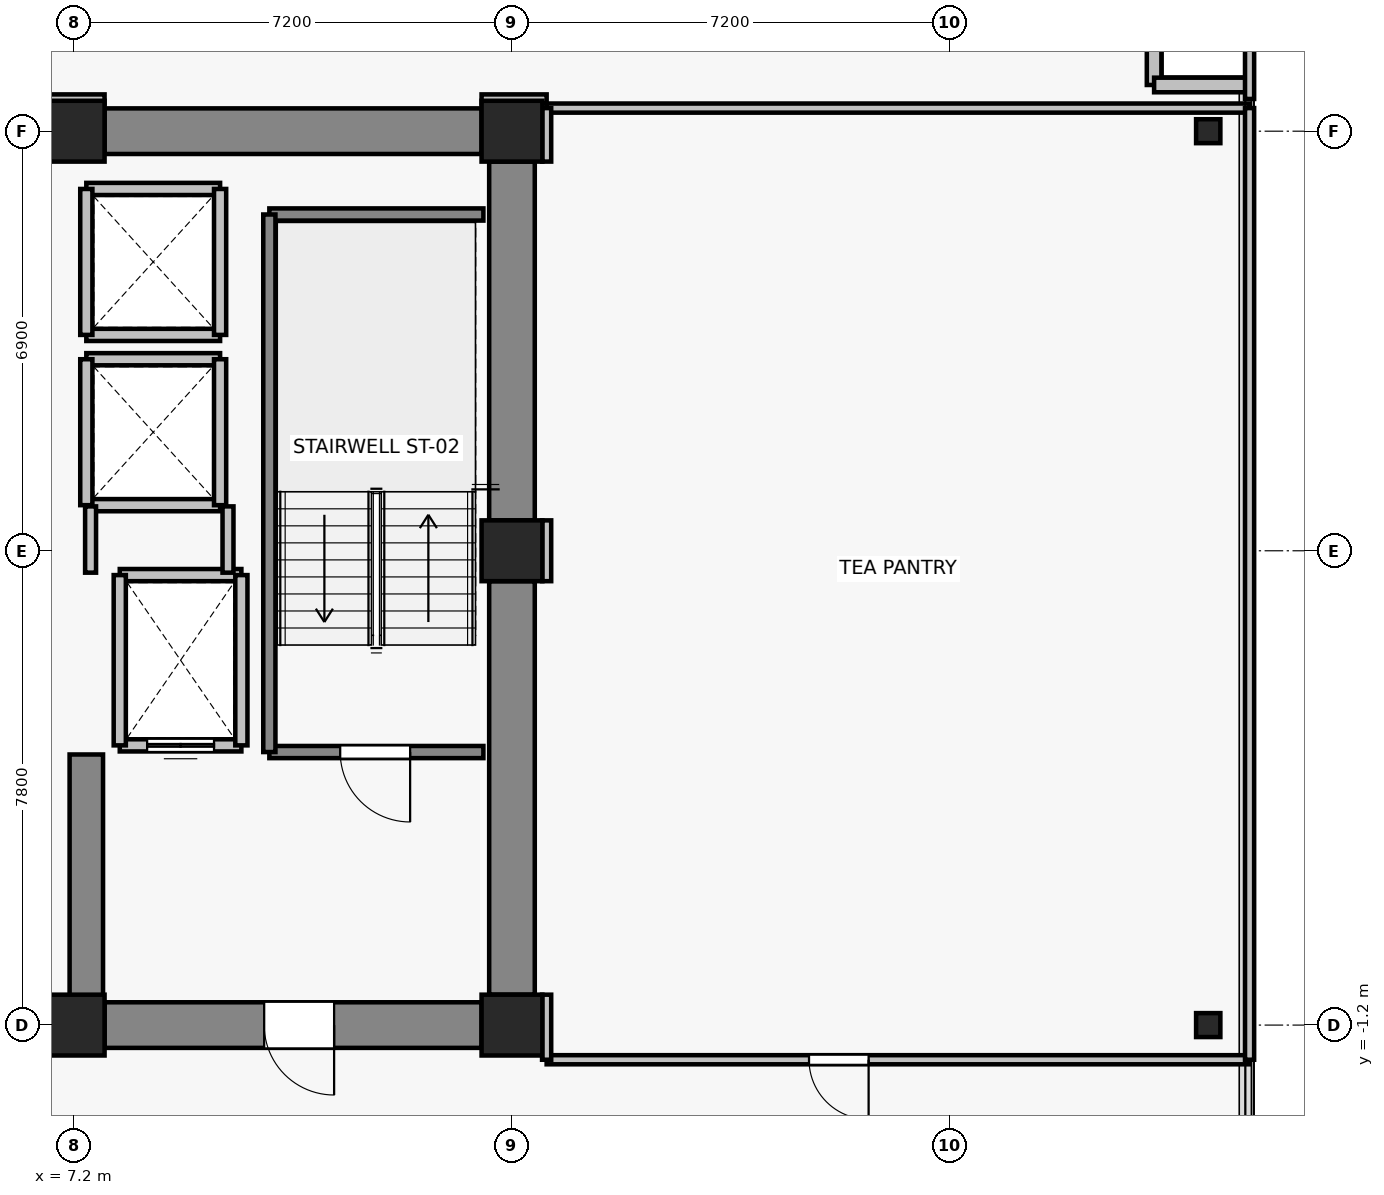
"""IFC4 building model, lengths in metres.
Left out: names, types, materials, properties, quantities, classifications, styles, units other than length and angle.
Written with IfcOpenShell. Run it as: python <this file> out.ifc"""

import sys

from ifc_helpers import new_model, si_unit, direction, frame, frame_2d, origin, origin_2d, place, context, subcontext, project, spatial, rectangle, i_section, extrude, source, transform, mapped, element, fill, save


model = new_model("IFC4")
c1 = context("Model", 3, precision=1e-05, world=origin(), true_north=direction((0.0, 1.0)))
c2 = subcontext(c1, "Body", "Model", "MODEL_VIEW")
j1 = project(units=[si_unit("LENGTHUNIT", "METRE"), si_unit("PLANEANGLEUNIT", "RADIAN")], contexts=[c1])
p1 = place(None, origin())
s1 = spatial("IfcSite", under=j1, at=p1, CompositionType="ELEMENT")
p2 = place(p1, origin())
s2 = spatial("IfcBuilding", under=s1, at=p2, CompositionType="ELEMENT")
p3 = place(p2, frame((0.0, 0.0, 179.2)))
s3 = spatial("IfcBuildingStorey", under=s2, at=p3, CompositionType="ELEMENT", Elevation=179.2)
for number, where, z_axis, x_axis in (
    (1, (7.2, -1.2, 0.0), (0.0, 0.0, 1.0), (1.0, 0.0, 0.0)),
    (2, (14.4, -1.2, 0.0), (0.0, 0.0, 1.0), (1.0, 0.0, 0.0)),
    (3, (14.4, 6.6, 0.0), (0.0, 0.0, 1.0), (1.0, 0.0, 0.0)),
    (4, (7.2, 13.5, 0.0), (0.0, 0.0, 1.0), (1.0, 0.0, 0.0)),
    (5, (14.4, 13.5, 0.0), (0.0, 0.0, 1.0), (1.0, 0.0, 0.0)),
):
    element("IfcColumn", number, at=place(p3, frame(where, z_axis=z_axis, x_axis=x_axis)), inside=s3, PredefinedType="COLUMN", context=c2, shape_type="SweptSolid", body=[
        extrude(rectangle(XDim=1.0, YDim=1.0, at=origin_2d()), origin(), (0.0, 0.0, 1.0), 3.3),
    ])
for number, where, z_axis, x_axis in (
    (6, (25.85, -1.2, 0.0), (0.0, 0.0, 1.0), (1.0, 0.0, 0.0)),
    (7, (25.85, 13.5, 0.0), (0.0, 0.0, 1.0), (1.0, 0.0, 0.0)),
):
    element("IfcColumn", number, at=place(p3, frame(where, z_axis=z_axis, x_axis=x_axis)), inside=s3, PredefinedType="COLUMN", context=c2, shape_type="SweptSolid", body=[
        extrude(i_section(OverallWidth=0.399, OverallDepth=0.394, WebThickness=0.023, FlangeThickness=0.037, FilletRadius=0.015, at=origin_2d()), origin(), (0.0, 0.0, 1.0), 3.3),
    ])
p4 = place(p3, frame((7.7, 13.5, 0.0), z_axis=(0.0, 0.0, 1.0), x_axis=(1.0, 0.0, 0.0)))
e8 = element("IfcWall", 8, at=p4, inside=s3, PredefinedType="SHEAR", context=c2, shape_type="SweptSolid", body=[
    extrude(rectangle(XDim=6.2, YDim=0.75, at=frame_2d((3.1, 0.0))), origin(), (0.0, 0.0, 1.0), 3.075),
])
p5 = place(p3, frame((14.4, -0.7, 0.0), z_axis=(0.0, 0.0, 1.0), x_axis=(0.0, 1.0, 0.0)))
e9 = element("IfcWall", 9, at=p5, inside=s3, PredefinedType="SHEAR", context=c2, shape_type="SweptSolid", body=[
    extrude(rectangle(XDim=6.8, YDim=0.75, at=frame_2d((3.4, 0.0))), origin(), (0.0, 0.0, 1.0), 3.075),
])
p6 = place(p3, frame((14.4, 7.1, 0.0), z_axis=(0.0, 0.0, 1.0), x_axis=(0.0, 1.0, 0.0)))
e10 = element("IfcWall", 10, at=p6, inside=s3, PredefinedType="SHEAR", context=c2, shape_type="SweptSolid", body=[
    extrude(rectangle(XDim=5.9, YDim=0.75, at=frame_2d((2.95, 0.0))), origin(), (0.0, 0.0, 1.0), 3.075),
])
p7 = place(p3, frame((13.9, -1.2, 0.0), z_axis=(0.0, 0.0, 1.0), x_axis=(-1.0, 0.0, 0.0)))
e11 = element("IfcWall", 11, at=p7, inside=s3, PredefinedType="SHEAR", context=c2, shape_type="SweptSolid", body=[
    extrude(rectangle(XDim=6.2, YDim=0.75, at=frame_2d((3.1, 0.0))), origin(), (0.0, 0.0, 1.0), 3.075),
])
p8 = place(p7, frame((2.425, 0.0, 0.0)))
e12 = element("IfcOpeningElement", 12, at=p8, cuts=e11, PredefinedType="OPENING", context=c2, shape_type="SweptSolid", body=[
    extrude(rectangle(XDim=1.15, YDim=2.15, at=frame_2d((0.575, 1.075))), frame((0.0, 0.385, 0.0), z_axis=(0.0, -1.0, 0.0), x_axis=(1.0, 0.0, 0.0)), (0.0, 0.0, 1.0), 0.77),
])
p9 = place(p3, frame((7.4, -0.825, 0.0), z_axis=(0.0, 0.0, 1.0), x_axis=(0.0, 1.0, 0.0)))
e13 = element("IfcWall", 13, at=p9, inside=s3, PredefinedType="SHEAR", context=c2, shape_type="SweptSolid", body=[
    extrude(rectangle(XDim=4.075, YDim=0.55, at=frame_2d((2.038, 0.0))), origin(), (0.0, 0.0, 1.0), 3.075),
])
for number, where, z_axis, x_axis in (
    (14, (24.96, 14.26, 0.0), (0.0, 0.0, 1.0), (0.0, 1.0, 0.0)),
    (15, (26.46, 14.26, 0.0), (0.0, 0.0, 1.0), (-1.0, 0.0, 0.0)),
):
    element("IfcWall", number, at=place(p3, frame(where, z_axis=z_axis, x_axis=x_axis)), inside=s3, PredefinedType="SOLIDWALL", context=c2, shape_type="SweptSolid", body=[
        extrude(rectangle(XDim=1.5, YDim=0.24, at=frame_2d((0.75, 0.0))), origin(), (0.0, 0.0, 1.0), 3.075),
    ])
p10 = place(p3, frame((9.95, 3.4, 0.0), z_axis=(0.0, 0.0, 1.0), x_axis=(-1.0, 0.0, 0.0)))
e16 = element("IfcWall", 16, at=p10, inside=s3, PredefinedType="SOLIDWALL", context=c2, shape_type="SweptSolid", body=[
    extrude(rectangle(XDim=2.0, YDim=0.2, at=frame_2d((1.0, 0.0))), origin(), (0.0, 0.0, 1.0), 3.075),
])
p11 = place(p10, frame((0.45, 0.0, 0.0)))
e17 = element("IfcOpeningElement", 17, at=p11, cuts=e16, PredefinedType="OPENING", context=c2, shape_type="SweptSolid", body=[
    extrude(rectangle(XDim=1.1, YDim=2.2, at=frame_2d((0.55, 1.1))), frame((0.0, 0.11, 0.0), z_axis=(0.0, -1.0, 0.0), x_axis=(1.0, 0.0, 0.0)), (0.0, 0.0, 1.0), 0.22),
])
p12 = place(p3, frame((7.95, 6.2, 0.0), z_axis=(0.0, 0.0, 1.0), x_axis=(1.0, 0.0, 0.0)))
e18 = element("IfcWall", 18, at=p12, inside=s3, PredefinedType="SOLIDWALL", context=c2, shape_type="SweptSolid", body=[
    extrude(rectangle(XDim=2.0, YDim=0.2, at=frame_2d((1.0, 0.0))), origin(), (0.0, 0.0, 1.0), 3.075),
])
for number, where, z_axis, x_axis in (
    (19, (7.95, 3.4, 0.0), (0.0, 0.0, 1.0), (0.0, 1.0, 0.0)),
    (20, (9.95, 6.2, 0.0), (0.0, 0.0, 1.0), (0.0, -1.0, 0.0)),
):
    element("IfcWall", number, at=place(p3, frame(where, z_axis=z_axis, x_axis=x_axis)), inside=s3, PredefinedType="SOLIDWALL", context=c2, shape_type="SweptSolid", body=[
        extrude(rectangle(XDim=2.8, YDim=0.2, at=frame_2d((1.4, 0.0))), origin(), (0.0, 0.0, 1.0), 3.075),
    ])
for number, where, z_axis, x_axis in (
    (21, (9.6, 7.35, 0.0), (0.0, 0.0, 1.0), (-1.0, 0.0, 0.0)),
    (22, (7.4, 9.75, 0.0), (0.0, 0.0, 1.0), (1.0, 0.0, 0.0)),
):
    element("IfcWall", number, at=place(p3, frame(where, z_axis=z_axis, x_axis=x_axis)), inside=s3, PredefinedType="SOLIDWALL", context=c2, shape_type="SweptSolid", body=[
        extrude(rectangle(XDim=2.2, YDim=0.2, at=frame_2d((1.1, 0.0))), origin(), (0.0, 0.0, 1.0), 2.565),
    ])
p13 = place(p3, frame((7.4, 7.35, 0.0), z_axis=(0.0, 0.0, 1.0), x_axis=(0.0, 1.0, 0.0)))
e23 = element("IfcWall", 23, at=p13, inside=s3, PredefinedType="SOLIDWALL", context=c2, shape_type="SweptSolid", body=[
    extrude(rectangle(XDim=2.4, YDim=0.2, at=frame_2d((1.2, 0.0))), origin(), (0.0, 0.0, 1.0), 2.565),
])
p14 = place(p3, frame((9.6, 9.75, 0.0), z_axis=(0.0, 0.0, 1.0), x_axis=(0.0, -1.0, 0.0)))
e24 = element("IfcWall", 24, at=p14, inside=s3, PredefinedType="SOLIDWALL", context=c2, shape_type="SweptSolid", body=[
    extrude(rectangle(XDim=2.4, YDim=0.2, at=frame_2d((1.2, 0.0))), origin(), (0.0, 0.0, 1.0), 3.075),
])
for number, where, z_axis, x_axis in (
    (25, (9.6, 10.15, 0.0), (0.0, 0.0, 1.0), (-1.0, 0.0, 0.0)),
    (26, (7.4, 12.55, 0.0), (0.0, 0.0, 1.0), (1.0, 0.0, 0.0)),
):
    element("IfcWall", number, at=place(p3, frame(where, z_axis=z_axis, x_axis=x_axis)), inside=s3, PredefinedType="SOLIDWALL", context=c2, shape_type="SweptSolid", body=[
        extrude(rectangle(XDim=2.2, YDim=0.2, at=frame_2d((1.1, 0.0))), origin(), (0.0, 0.0, 1.0), 2.565),
    ])
p15 = place(p3, frame((7.4, 10.15, 0.0), z_axis=(0.0, 0.0, 1.0), x_axis=(0.0, 1.0, 0.0)))
e27 = element("IfcWall", 27, at=p15, inside=s3, PredefinedType="SOLIDWALL", context=c2, shape_type="SweptSolid", body=[
    extrude(rectangle(XDim=2.4, YDim=0.2, at=frame_2d((1.2, 0.0))), origin(), (0.0, 0.0, 1.0), 2.565),
])
p16 = place(p3, frame((9.6, 12.55, 0.0), z_axis=(0.0, 0.0, 1.0), x_axis=(0.0, -1.0, 0.0)))
e28 = element("IfcWall", 28, at=p16, inside=s3, PredefinedType="SOLIDWALL", context=c2, shape_type="SweptSolid", body=[
    extrude(rectangle(XDim=2.4, YDim=0.2, at=frame_2d((1.2, 0.0))), origin(), (0.0, 0.0, 1.0), 3.075),
])
p17 = place(p3, frame((13.93, 3.29, 0.0), z_axis=(0.0, 0.0, 1.0), x_axis=(-1.0, 0.0, 0.0)))
e29 = element("IfcWall", 29, at=p17, inside=s3, PredefinedType="SOLIDWALL", context=c2, shape_type="SweptSolid", body=[
    extrude(rectangle(XDim=3.52, YDim=0.2, at=frame_2d((1.76, 0.0))), origin(), (0.0, 0.0, 1.0), 3.075),
])
p18 = place(p17, frame((1.205, 0.0, 0.0)))
e30 = element("IfcOpeningElement", 30, at=p18, cuts=e29, PredefinedType="OPENING", context=c2, shape_type="SweptSolid", body=[
    extrude(rectangle(XDim=1.15, YDim=2.15, at=frame_2d((0.575, 1.075))), frame((0.0, 0.11, 0.0), z_axis=(0.0, -1.0, 0.0), x_axis=(1.0, 0.0, 0.0)), (0.0, 0.0, 1.0), 0.22),
])
p19 = place(p3, frame((10.41, 12.13, 0.0), z_axis=(0.0, 0.0, 1.0), x_axis=(1.0, 0.0, 0.0)))
e31 = element("IfcWall", 31, at=p19, inside=s3, PredefinedType="SOLIDWALL", context=c2, shape_type="SweptSolid", body=[
    extrude(rectangle(XDim=3.52, YDim=0.2, at=frame_2d((1.76, 0.0))), origin(), (0.0, 0.0, 1.0), 3.075),
])
p20 = place(p3, frame((10.41, 3.29, 0.0), z_axis=(0.0, 0.0, 1.0), x_axis=(0.0, 1.0, 0.0)))
e32 = element("IfcWall", 32, at=p20, inside=s3, PredefinedType="SOLIDWALL", context=c2, shape_type="SweptSolid", body=[
    extrude(rectangle(XDim=8.84, YDim=0.2, at=frame_2d((4.42, 0.0))), origin(), (0.0, 0.0, 1.0), 3.075),
])
p21 = place(p3, frame((7.47, 6.24, 0.0), z_axis=(0.0, 0.0, 1.0), x_axis=(0.0, 1.0, 0.0)))
e33 = element("IfcWall", 33, at=p21, inside=s3, PredefinedType="PARTITIONING", context=c2, shape_type="SweptSolid", body=[
    extrude(rectangle(XDim=1.09, YDim=0.18, at=frame_2d((0.545, 0.0))), origin(), (0.0, 0.0, 1.0), 2.565),
])
p22 = place(p3, frame((9.73, 7.33, 0.0), z_axis=(0.0, 0.0, 1.0), x_axis=(0.0, -1.0, 0.0)))
e34 = element("IfcWall", 34, at=p22, inside=s3, PredefinedType="PARTITIONING", context=c2, shape_type="SweptSolid", body=[
    extrude(rectangle(XDim=1.09, YDim=0.18, at=frame_2d((0.545, 0.0))), origin(), (0.0, 0.0, 1.0), 3.075),
])
p23 = place(p3, frame((26.53, -1.77, 0.0), z_axis=(0.0, 0.0, 1.0), x_axis=(-1.0, 0.0, 0.0)))
e35 = element("IfcWall", 35, at=p23, inside=s3, PredefinedType="PARTITIONING", context=c2, shape_type="SweptSolid", body=[
    extrude(rectangle(XDim=11.56, YDim=0.15, at=frame_2d((5.78, 0.0))), origin(), (0.0, 0.0, 1.0), 2.565),
])
p24 = place(p23, frame((6.265, 0.0, 0.0)))
e36 = element("IfcOpeningElement", 36, at=p24, cuts=e35, PredefinedType="OPENING", context=c2, shape_type="SweptSolid", body=[
    extrude(rectangle(XDim=0.98, YDim=2.15, at=frame_2d((0.49, 1.075))), frame((0.0, 0.085, 0.0), z_axis=(0.0, -1.0, 0.0), x_axis=(1.0, 0.0, 0.0)), (0.0, 0.0, 1.0), 0.17),
])
p25 = place(p3, frame((14.97, 13.88, 0.0), z_axis=(0.0, 0.0, 1.0), x_axis=(1.0, 0.0, 0.0)))
e37 = element("IfcWall", 37, at=p25, inside=s3, PredefinedType="PARTITIONING", context=c2, shape_type="SweptSolid", body=[
    extrude(rectangle(XDim=11.56, YDim=0.15, at=frame_2d((5.78, 0.0))), origin(), (0.0, 0.0, 1.0), 3.075),
])
p26 = place(p3, frame((14.97, -1.77, 0.0), z_axis=(0.0, 0.0, 1.0), x_axis=(0.0, 1.0, 0.0)))
e38 = element("IfcWall", 38, at=p26, inside=s3, PredefinedType="PARTITIONING", context=c2, shape_type="SweptSolid", body=[
    extrude(rectangle(XDim=1.07, YDim=0.15, at=frame_2d((0.535, 0.0))), origin(), (0.0, 0.0, 1.0), 2.565),
])
p27 = place(p3, frame((14.97, 6.1, 0.0), z_axis=(0.0, 0.0, 1.0), x_axis=(0.0, 1.0, 0.0)))
e39 = element("IfcWall", 39, at=p27, inside=s3, PredefinedType="PARTITIONING", context=c2, shape_type="SweptSolid", body=[
    extrude(rectangle(XDim=1.0, YDim=0.15, at=frame_2d((0.5, 0.0))), origin(), (0.0, 0.0, 1.0), 3.075),
])
p28 = place(p3, frame((14.97, 13.0, 0.0), z_axis=(0.0, 0.0, 1.0), x_axis=(0.0, 1.0, 0.0)))
e40 = element("IfcWall", 40, at=p28, inside=s3, PredefinedType="PARTITIONING", context=c2, shape_type="SweptSolid", body=[
    extrude(rectangle(XDim=0.88, YDim=0.15, at=frame_2d((0.44, 0.0))), origin(), (0.0, 0.0, 1.0), 2.565),
])
p29 = place(p3, frame((26.53, 13.88, 0.0), z_axis=(0.0, 0.0, 1.0), x_axis=(0.0, -1.0, 0.0)))
e41 = element("IfcWall", 41, at=p29, inside=s3, PredefinedType="PARTITIONING", context=c2, shape_type="SweptSolid", body=[
    extrude(rectangle(XDim=15.65, YDim=0.15, at=frame_2d((7.825, 0.0))), origin(), (0.0, 0.0, 1.0), 3.075),
])
p30 = place(p3, frame((7.7, 14.03, 0.0), z_axis=(0.0, 0.0, 1.0), x_axis=(-1.0, 0.0, 0.0)))
e42 = element("IfcWall", 42, at=p30, inside=s3, PredefinedType="PARTITIONING", context=c2, shape_type="SweptSolid", body=[
    extrude(rectangle(XDim=1.0, YDim=0.15, at=frame_2d((0.5, 0.0))), origin(), (0.0, 0.0, 1.0), 2.565),
])
p31 = place(p3, frame((14.97, 14.03, 0.0), z_axis=(0.0, 0.0, 1.0), x_axis=(-1.0, 0.0, 0.0)))
e43 = element("IfcWall", 43, at=p31, inside=s3, PredefinedType="PARTITIONING", context=c2, shape_type="SweptSolid", body=[
    extrude(rectangle(XDim=1.07, YDim=0.15, at=frame_2d((0.535, 0.0))), origin(), (0.0, 0.0, 1.0), 2.565),
])
p32 = place(p3, frame((26.53, 17.33, 0.0), z_axis=(0.0, 0.0, 1.0), x_axis=(0.0, -1.0, 0.0)))
e44 = element("IfcWall", 44, at=p32, inside=s3, PredefinedType="PARTITIONING", context=c2, shape_type="SweptSolid", body=[
    extrude(rectangle(XDim=3.3, YDim=0.15, at=frame_2d((1.65, 0.0))), origin(), (0.0, 0.0, 1.0), 3.075),
])
m1 = source(origin(), c2, "Body", "SweptSolid", [
    extrude(rectangle(XDim=1.1, YDim=2.2, at=frame_2d((0.55, 1.1))), frame((0.0, 0.025, 0.0), z_axis=(0.0, -1.0, 0.0), x_axis=(1.0, 0.0, 0.0)), (0.0, 0.0, 1.0), 0.05),
])
p33 = place(p11, origin())
e45 = element("IfcDoor", 45, at=p33, inside=s3, OperationType="DOUBLE_DOOR_SLIDING", PredefinedType="DOOR", context=c2, shape_type="MappedRepresentation", body=[
    mapped(m1, transform((0.0, 0.0, 0.0), x_axis=(1.0, 0.0, 0.0), y_axis=(0.0, 1.0, 0.0), z_axis=(0.0, 0.0, 1.0), scale=1.0)),
])
fill(e17, e45)
m2 = source(origin(), c2, "Body", "SweptSolid", [
    extrude(rectangle(XDim=1.15, YDim=2.15, at=frame_2d((0.575, 1.075))), frame((0.0, 0.025, 0.0), z_axis=(0.0, -1.0, 0.0), x_axis=(1.0, 0.0, 0.0)), (0.0, 0.0, 1.0), 0.05),
])
p34 = place(p18, origin())
e46 = element("IfcDoor", 46, at=p34, inside=s3, OperationType="SINGLE_SWING_LEFT", PredefinedType="DOOR", context=c2, shape_type="MappedRepresentation", body=[
    mapped(m2, transform((0.0, 0.0, 0.0), x_axis=(1.0, 0.0, 0.0), y_axis=(0.0, 1.0, 0.0), z_axis=(0.0, 0.0, 1.0), scale=1.0)),
])
fill(e30, e46)
p35 = place(p8, origin())
e47 = element("IfcDoor", 47, at=p35, inside=s3, OperationType="SINGLE_SWING_LEFT", PredefinedType="DOOR", context=c2, shape_type="MappedRepresentation", body=[
    mapped(m2, transform((0.0, 0.0, 0.0), x_axis=(1.0, 0.0, 0.0), y_axis=(0.0, 1.0, 0.0), z_axis=(0.0, 0.0, 1.0), scale=1.0)),
])
fill(e12, e47)
m3 = source(origin(), c2, "Body", "SweptSolid", [
    extrude(rectangle(XDim=0.98, YDim=2.15, at=frame_2d((0.49, 1.075))), frame((0.0, 0.025, 0.0), z_axis=(0.0, -1.0, 0.0), x_axis=(1.0, 0.0, 0.0)), (0.0, 0.0, 1.0), 0.05),
])
p36 = place(p24, origin())
e48 = element("IfcDoor", 48, at=p36, inside=s3, OperationType="SINGLE_SWING_LEFT", PredefinedType="DOOR", context=c2, shape_type="MappedRepresentation", body=[
    mapped(m3, transform((0.0, 0.0, 0.0), x_axis=(1.0, 0.0, 0.0), y_axis=(0.0, 1.0, 0.0), z_axis=(0.0, 0.0, 1.0), scale=1.0)),
])
fill(e36, e48)
save(model, sys.argv[1])
